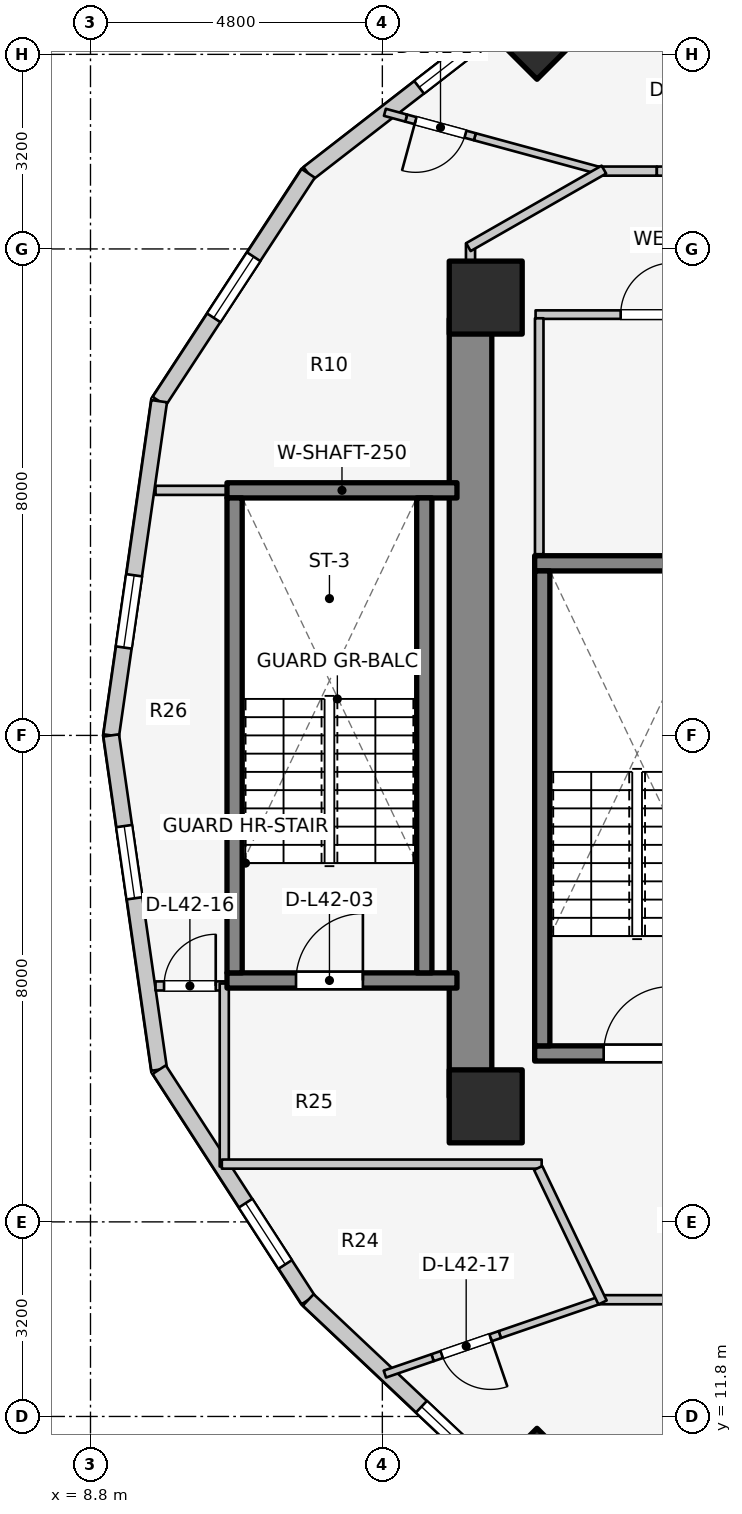
"""IFC4 building model, lengths in metres.
Left out: names, types, materials, properties, quantities, classifications, styles, units other than length and angle.
Written with IfcOpenShell. Run it as: python <this file> out.ifc"""

import sys

from ifc_helpers import new_model, si_unit, direction, frame, frame_2d, origin, origin_2d, place, context, subcontext, project, spatial, rectangle, extrude, element, fill, save


model = new_model("IFC4")
c1 = context("Model", 3, precision=1e-05, world=origin(), true_north=direction((0.0, 1.0)))
c2 = subcontext(c1, "Body", "Model", "MODEL_VIEW")
j1 = project(units=[si_unit("LENGTHUNIT", "METRE"), si_unit("PLANEANGLEUNIT", "RADIAN")], contexts=[c1])
p1 = place(None, origin())
s1 = spatial("IfcSite", under=j1, at=p1, CompositionType="ELEMENT")
p2 = place(p1, origin())
s2 = spatial("IfcBuilding", under=s1, at=p2, CompositionType="ELEMENT")
p3 = place(p2, frame((0.0, 0.0, 140.5)))
s3 = spatial("IfcBuildingStorey", under=s2, at=p3, CompositionType="ELEMENT", Elevation=140.5)
p4 = place(p3, frame((15.05, 17.05, 0.0), z_axis=(0.0, 0.0, 1.0), x_axis=(0.0, 1.0, 0.0)))
e1 = element("IfcWall", 1, at=p4, inside=s3, PredefinedType="SHEAR", context=c2, shape_type="SweptSolid", body=[
    extrude(rectangle(XDim=12.8, YDim=0.7, at=frame_2d((6.4, 0.0))), origin(), (0.0, 0.0, 1.0), 3.1),
])
p5 = place(p3, frame((16.105, 17.77, 0.0), z_axis=(0.0, 0.0, 1.0), x_axis=(1.0, 0.0, 0.0)))
e2 = element("IfcWall", 2, at=p5, inside=s3, PredefinedType="SOLIDWALL", context=c2, shape_type="SweptSolid", body=[
    extrude(rectangle(XDim=3.37, YDim=0.25, at=frame_2d((1.685, 0.0))), origin(), (0.0, 0.0, 1.0), 3.1),
])
p6 = place(p5, frame((1.135, 0.0, 0.0)))
e3 = element("IfcOpeningElement", 3, at=p6, cuts=e2, PredefinedType="OPENING", context=c2, shape_type="SweptSolid", body=[
    extrude(rectangle(XDim=1.1, YDim=2.1, at=frame_2d((0.55, 1.05))), frame((0.0, 0.135, 0.0), z_axis=(0.0, -1.0, 0.0), x_axis=(1.0, 0.0, 0.0)), (0.0, 0.0, 1.0), 0.27),
])
p7 = place(p3, frame((16.105, 25.83, 0.0), z_axis=(0.0, 0.0, 1.0), x_axis=(1.0, 0.0, 0.0)))
e4 = element("IfcWall", 4, at=p7, inside=s3, PredefinedType="SOLIDWALL", context=c2, shape_type="SweptSolid", body=[
    extrude(rectangle(XDim=3.37, YDim=0.25, at=frame_2d((1.685, 0.0))), origin(), (0.0, 0.0, 1.0), 3.1),
])
p8 = place(p3, frame((16.23, 17.895, 0.0), z_axis=(0.0, 0.0, 1.0), x_axis=(0.0, 1.0, 0.0)))
e5 = element("IfcWall", 5, at=p8, inside=s3, PredefinedType="SOLIDWALL", context=c2, shape_type="SweptSolid", body=[
    extrude(rectangle(XDim=7.81, YDim=0.25, at=frame_2d((3.905, 0.0))), origin(), (0.0, 0.0, 1.0), 3.1),
])
p9 = place(p3, frame((11.045, 18.97, 0.0), z_axis=(0.0, 0.0, 1.0), x_axis=(1.0, 0.0, 0.0)))
e6 = element("IfcWall", 6, at=p9, inside=s3, PredefinedType="SOLIDWALL", context=c2, shape_type="SweptSolid", body=[
    extrude(rectangle(XDim=3.782, YDim=0.25, at=frame_2d((1.891, 0.0))), origin(), (0.0, 0.0, 1.0), 3.1),
])
p10 = place(p9, frame((1.135, 0.0, 0.0)))
e7 = element("IfcOpeningElement", 7, at=p10, cuts=e6, PredefinedType="OPENING", context=c2, shape_type="SweptSolid", body=[
    extrude(rectangle(XDim=1.1, YDim=2.1, at=frame_2d((0.55, 1.05))), frame((0.0, 0.135, 0.0), z_axis=(0.0, -1.0, 0.0), x_axis=(1.0, 0.0, 0.0)), (0.0, 0.0, 1.0), 0.27),
])
p11 = place(p3, frame((11.045, 27.03, 0.0), z_axis=(0.0, 0.0, 1.0), x_axis=(1.0, 0.0, 0.0)))
e8 = element("IfcWall", 8, at=p11, inside=s3, PredefinedType="SOLIDWALL", context=c2, shape_type="SweptSolid", body=[
    extrude(rectangle(XDim=3.782, YDim=0.25, at=frame_2d((1.891, 0.0))), origin(), (0.0, 0.0, 1.0), 3.1),
])
for number, where, z_axis, x_axis in (
    (9, (11.17, 19.095, 0.0), (0.0, 0.0, 1.0), (0.0, 1.0, 0.0)),
    (10, (14.29, 19.095, 0.0), (0.0, 0.0, 1.0), (0.0, 1.0, 0.0)),
):
    element("IfcWall", number, at=place(p3, frame(where, z_axis=z_axis, x_axis=x_axis)), inside=s3, PredefinedType="SOLIDWALL", context=c2, shape_type="SweptSolid", body=[
        extrude(rectangle(XDim=7.81, YDim=0.25, at=frame_2d((3.905, 0.0))), origin(), (0.0, 0.0, 1.0), 3.1),
    ])
for number, where, z_axis, x_axis in (
    (11, (15.3, 16.9, 0.0), (0.0, 0.0, 1.0), (1.0, 0.0, 0.0)),
    (12, (15.3, 30.2, 0.0), (0.0, 0.0, 1.0), (1.0, 0.0, 0.0)),
):
    element("IfcColumn", number, at=place(p3, frame(where, z_axis=z_axis, x_axis=x_axis)), inside=s3, PredefinedType="COLUMN", context=c2, shape_type="SweptSolid", body=[
        extrude(rectangle(XDim=1.2, YDim=1.2, at=origin_2d()), origin(), (0.0, 0.0, 1.0), 3.1),
    ])
for number, where, z_axis, x_axis in (
    (13, (16.143, 34.427, 0.0), (0.0, 0.0, 1.0), (-0.707, 0.707, 0.0)),
    (14, (16.143, 10.969, 0.0), (0.0, 0.0, 1.0), (-0.707, -0.707, 0.0)),
):
    element("IfcColumn", number, at=place(p3, frame(where, z_axis=z_axis, x_axis=x_axis)), inside=s3, PredefinedType="COLUMN", context=c2, shape_type="SweptSolid", body=[
        extrude(rectangle(XDim=0.9, YDim=0.9, at=origin_2d()), origin(), (0.0, 0.0, 1.0), 3.1),
    ])
p12 = place(p3, frame((15.731, 34.842, 0.0), z_axis=(0.0, 0.0, 1.0), x_axis=(-0.790185650662, -0.612867552973, 0.0)))
e15 = element("IfcWall", 15, at=p12, inside=s3, PredefinedType="STANDARD", context=c2, shape_type="SweptSolid", body=[
    extrude(rectangle(XDim=4.239, YDim=0.26, at=frame_2d((2.12, 0.0))), origin(), (0.0, 0.0, 1.0), 1.22),
])
p13 = place(p12, frame((0.731, 0.0, 0.15)))
e16 = element("IfcOpeningElement", 16, at=p13, cuts=e15, PredefinedType="OPENING", context=c2, shape_type="SweptSolid", body=[
    extrude(rectangle(XDim=1.2, YDim=0.9, at=frame_2d((0.6, 0.45))), frame((0.0, 0.14, 0.0), z_axis=(0.0, -1.0, 0.0), x_axis=(1.0, 0.0, 0.0)), (0.0, 0.0, 1.0), 0.28),
])
p14 = place(p3, frame((12.381, 32.243, 0.0), z_axis=(0.0, 0.0, 1.0), x_axis=(-0.547456494366, -0.836834145322, 0.0)))
e17 = element("IfcWall", 17, at=p14, inside=s3, PredefinedType="STANDARD", context=c2, shape_type="SweptSolid", body=[
    extrude(rectangle(XDim=4.477, YDim=0.26, at=frame_2d((2.239, 0.0))), origin(), (0.0, 0.0, 1.0), 1.22),
])
p15 = place(p14, frame((1.639, 0.0, 0.15)))
e18 = element("IfcOpeningElement", 18, at=p15, cuts=e17, PredefinedType="OPENING", context=c2, shape_type="SweptSolid", body=[
    extrude(rectangle(XDim=1.2, YDim=0.9, at=frame_2d((0.6, 0.45))), frame((0.0, 0.14, 0.0), z_axis=(0.0, -1.0, 0.0), x_axis=(1.0, 0.0, 0.0)), (0.0, 0.0, 1.0), 0.28),
])
p16 = place(p3, frame((9.93, 28.497, 0.0), z_axis=(0.0, 0.0, 1.0), x_axis=(-0.142227632286, -0.989833976288, 0.0)))
e19 = element("IfcWall", 19, at=p16, inside=s3, PredefinedType="STANDARD", context=c2, shape_type="SweptSolid", body=[
    extrude(rectangle(XDim=5.553, YDim=0.26, at=frame_2d((2.776, 0.0))), origin(), (0.0, 0.0, 1.0), 2.57),
])
p17 = place(p16, frame((2.892, 0.0, 0.75)))
e20 = element("IfcOpeningElement", 20, at=p17, cuts=e19, PredefinedType="OPENING", context=c2, shape_type="SweptSolid", body=[
    extrude(rectangle(XDim=1.2, YDim=1.5, at=frame_2d((0.6, 0.75))), frame((0.0, 0.14, 0.0), z_axis=(0.0, -1.0, 0.0), x_axis=(1.0, 0.0, 0.0)), (0.0, 0.0, 1.0), 0.28),
])
p18 = place(p3, frame((9.14, 23.0, 0.0), z_axis=(0.0, 0.0, 1.0), x_axis=(0.142227632286, -0.989833976288, 0.0)))
e21 = element("IfcWall", 21, at=p18, inside=s3, PredefinedType="STANDARD", context=c2, shape_type="SweptSolid", body=[
    extrude(rectangle(XDim=5.553, YDim=0.26, at=frame_2d((2.776, 0.0))), origin(), (0.0, 0.0, 1.0), 2.57),
])
p19 = place(p18, frame((1.506, 0.0, 0.75)))
e22 = element("IfcOpeningElement", 22, at=p19, cuts=e21, PredefinedType="OPENING", context=c2, shape_type="SweptSolid", body=[
    extrude(rectangle(XDim=1.2, YDim=1.5, at=frame_2d((0.6, 0.75))), frame((0.0, 0.14, 0.0), z_axis=(0.0, -1.0, 0.0), x_axis=(1.0, 0.0, 0.0)), (0.0, 0.0, 1.0), 0.28),
])
p20 = place(p3, frame((9.93, 17.503, 0.0), z_axis=(0.0, 0.0, 1.0), x_axis=(0.543358984534, -0.839500454989, 0.0)))
e23 = element("IfcWall", 23, at=p20, inside=s3, PredefinedType="STANDARD", context=c2, shape_type="SweptSolid", body=[
    extrude(rectangle(XDim=4.511, YDim=0.26, at=frame_2d((2.256, 0.0))), origin(), (0.0, 0.0, 1.0), 1.22),
])
p21 = place(p20, frame((2.615, 0.0, 0.15)))
e24 = element("IfcOpeningElement", 24, at=p21, cuts=e23, PredefinedType="OPENING", context=c2, shape_type="SweptSolid", body=[
    extrude(rectangle(XDim=1.2, YDim=0.9, at=frame_2d((0.6, 0.45))), frame((0.0, 0.14, 0.0), z_axis=(0.0, -1.0, 0.0), x_axis=(1.0, 0.0, 0.0)), (0.0, 0.0, 1.0), 0.28),
])
p22 = place(p3, frame((12.381, 13.716, 0.0), z_axis=(0.0, 0.0, 1.0), x_axis=(0.727667301037, -0.68593024354, 0.0)))
e25 = element("IfcWall", 25, at=p22, inside=s3, PredefinedType="STANDARD", context=c2, shape_type="SweptSolid", body=[
    extrude(rectangle(XDim=4.604, YDim=0.26, at=frame_2d((2.302, 0.0))), origin(), (0.0, 0.0, 1.0), 1.22),
])
p23 = place(p22, frame((2.56, 0.0, 0.15)))
e26 = element("IfcOpeningElement", 26, at=p23, cuts=e25, PredefinedType="OPENING", context=c2, shape_type="SweptSolid", body=[
    extrude(rectangle(XDim=1.2, YDim=0.9, at=frame_2d((0.6, 0.45))), frame((0.0, 0.14, 0.0), z_axis=(0.0, -1.0, 0.0), x_axis=(1.0, 0.0, 0.0)), (0.0, 0.0, 1.0), 0.28),
])
p24 = place(p3, frame((16.12, 29.92, 0.0), z_axis=(0.0, 0.0, 1.0), x_axis=(1.0, 0.0, 0.0)))
e27 = element("IfcWall", 27, at=p24, inside=s3, PredefinedType="PLUMBINGWALL", context=c2, shape_type="SweptSolid", body=[
    extrude(rectangle(XDim=3.3, YDim=0.14, at=frame_2d((1.65, 0.0))), origin(), (0.0, 0.0, 1.0), 2.575),
])
p25 = place(p24, frame((1.399, 0.0, 0.0)))
e28 = element("IfcOpeningElement", 28, at=p25, cuts=e27, PredefinedType="OPENING", context=c2, shape_type="SweptSolid", body=[
    extrude(rectangle(XDim=0.85, YDim=2.05, at=frame_2d((0.425, 1.025))), frame((0.0, 0.08, 0.0), z_axis=(0.0, -1.0, 0.0), x_axis=(1.0, 0.0, 0.0)), (0.0, 0.0, 1.0), 0.16),
])
p26 = place(p3, frame((16.18, 25.98, 0.0), z_axis=(0.0, 0.0, 1.0), x_axis=(0.0, 1.0, 0.0)))
e29 = element("IfcWall", 29, at=p26, inside=s3, PredefinedType="PLUMBINGWALL", context=c2, shape_type="SweptSolid", body=[
    extrude(rectangle(XDim=3.88, YDim=0.14, at=frame_2d((1.94, 0.0))), origin(), (0.0, 0.0, 1.0), 2.575),
])
p27 = place(p3, frame((9.87, 27.03, 0.0), z_axis=(0.0, 0.0, 1.0), x_axis=(1.0, 0.0, 0.0)))
e30 = element("IfcWall", 30, at=p27, inside=s3, PredefinedType="PARTITIONING", context=c2, shape_type="SweptSolid", body=[
    extrude(rectangle(XDim=1.17, YDim=0.15, at=frame_2d((0.585, 0.0))), origin(), (0.0, 0.0, 1.0), 2.575),
])
p28 = place(p3, frame((15.05, 29.8, 0.0), z_axis=(0.0, 0.0, 1.0), x_axis=(0.0, 1.0, 0.0)))
e31 = element("IfcWall", 31, at=p28, inside=s3, PredefinedType="PARTITIONING", context=c2, shape_type="SweptSolid", body=[
    extrude(rectangle(XDim=1.29, YDim=0.15, at=frame_2d((0.645, 0.0))), origin(), (0.0, 0.0, 1.0), 1.22),
])
p29 = place(p3, frame((17.248, 32.267, 0.0), z_axis=(0.0, 0.0, 1.0), x_axis=(-0.964996026859, 0.262264500356, 0.0)))
e32 = element("IfcWall", 32, at=p29, inside=s3, PredefinedType="MOVABLE", context=c2, shape_type="SweptSolid", body=[
    extrude(rectangle(XDim=2.204, YDim=0.12, at=frame_2d((1.102, 0.0))), origin(), (0.0, 0.0, 1.0), 1.22),
])
p30 = place(p3, frame((15.121, 32.845, 0.0), z_axis=(0.0, 0.0, 1.0), x_axis=(-0.964994566257, 0.262269874548, 0.0)))
e33 = element("IfcWall", 33, at=p30, inside=s3, PredefinedType="MOVABLE", context=c2, shape_type="SweptSolid", body=[
    extrude(rectangle(XDim=1.17, YDim=0.12, at=frame_2d((0.585, 0.0))), origin(), (0.0, 0.0, 1.0), 2.575),
])
p31 = place(p30, frame((0.16, 0.0, 0.0)))
e34 = element("IfcOpeningElement", 34, at=p31, cuts=e33, PredefinedType="OPENING", context=c2, shape_type="SweptSolid", body=[
    extrude(rectangle(XDim=0.85, YDim=2.05, at=frame_2d((0.425, 1.025))), frame((0.0, 0.07, 0.0), z_axis=(0.0, -1.0, 0.0), x_axis=(1.0, 0.0, 0.0)), (0.0, 0.0, 1.0), 0.14),
])
p32 = place(p3, frame((13.992, 33.152, 0.0), z_axis=(0.0, 0.0, 1.0), x_axis=(-0.964996222189, 0.26226378164, 0.0)))
e35 = element("IfcWall", 35, at=p32, inside=s3, PredefinedType="MOVABLE", context=c2, shape_type="SweptSolid", body=[
    extrude(rectangle(XDim=0.363, YDim=0.12, at=frame_2d((0.182, 0.0))), origin(), (0.0, 0.0, 1.0), 2.575),
])
p33 = place(p3, frame((17.15, 32.28, 0.0), z_axis=(0.0, 0.0, 1.0), x_axis=(1.0, 0.0, 0.0)))
e36 = element("IfcWall", 36, at=p33, inside=s3, PredefinedType="PARTITIONING", context=c2, shape_type="SweptSolid", body=[
    extrude(rectangle(XDim=0.964, YDim=0.15, at=frame_2d((0.482, 0.0))), origin(), (0.0, 0.0, 1.0), 2.575),
])
p34 = place(p3, frame((18.114, 32.28, 0.0), z_axis=(0.0, 0.0, 1.0), x_axis=(1.0, 0.0, 0.0)))
e37 = element("IfcWall", 37, at=p34, inside=s3, PredefinedType="PARTITIONING", context=c2, shape_type="SweptSolid", body=[
    extrude(rectangle(XDim=1.22, YDim=0.15, at=frame_2d((0.61, 0.0))), origin(), (0.0, 0.0, 1.0), 2.16),
])
p35 = place(p34, frame((0.16, 0.0, 0.0)))
e38 = element("IfcOpeningElement", 38, at=p35, cuts=e37, PredefinedType="OPENING", context=c2, shape_type="SweptSolid", body=[
    extrude(rectangle(XDim=0.9, YDim=2.1, at=frame_2d((0.45, 1.05))), frame((0.0, 0.085, 0.0), z_axis=(0.0, -1.0, 0.0), x_axis=(1.0, 0.0, 0.0)), (0.0, 0.0, 1.0), 0.17),
])
p36 = place(p3, frame((17.243, 32.305, 0.0), z_axis=(0.0, 0.0, 1.0), x_axis=(-0.867991349648, -0.496579315857, 0.0)))
e39 = element("IfcWall", 39, at=p36, inside=s3, PredefinedType="PARTITIONING", context=c2, shape_type="SweptSolid", body=[
    extrude(rectangle(XDim=2.567, YDim=0.15, at=frame_2d((1.283, 0.0))), origin(), (0.0, 0.0, 1.0), 1.22),
])
p37 = place(p3, frame((9.87, 18.88, 0.0), z_axis=(0.0, 0.0, 1.0), x_axis=(1.0, 0.0, 0.0)))
e40 = element("IfcWall", 40, at=p37, inside=s3, PredefinedType="PARTITIONING", context=c2, shape_type="SweptSolid", body=[
    extrude(rectangle(XDim=1.17, YDim=0.15, at=frame_2d((0.585, 0.0))), origin(), (0.0, 0.0, 1.0), 2.575),
])
p38 = place(p37, frame((0.14, 0.0, 0.0)))
e41 = element("IfcOpeningElement", 41, at=p38, cuts=e40, PredefinedType="OPENING", context=c2, shape_type="SweptSolid", body=[
    extrude(rectangle(XDim=0.85, YDim=2.05, at=frame_2d((0.425, 1.025))), frame((0.0, 0.085, 0.0), z_axis=(0.0, -1.0, 0.0), x_axis=(1.0, 0.0, 0.0)), (0.0, 0.0, 1.0), 0.17),
])
p39 = place(p3, frame((11.0, 15.91, 0.0), z_axis=(0.0, 0.0, 1.0), x_axis=(0.0, 1.0, 0.0)))
e42 = element("IfcWall", 42, at=p39, inside=s3, PredefinedType="PARTITIONING", context=c2, shape_type="SweptSolid", body=[
    extrude(rectangle(XDim=3.01, YDim=0.15, at=frame_2d((1.505, 0.0))), origin(), (0.0, 0.0, 1.0), 2.575),
])
p40 = place(p3, frame((10.96, 15.95, 0.0), z_axis=(0.0, 0.0, 1.0), x_axis=(1.0, 0.0, 0.0)))
e43 = element("IfcWall", 43, at=p40, inside=s3, PredefinedType="PARTITIONING", context=c2, shape_type="SweptSolid", body=[
    extrude(rectangle(XDim=5.26, YDim=0.15, at=frame_2d((2.63, 0.0))), origin(), (0.0, 0.0, 1.0), 1.22),
])
p41 = place(p3, frame((17.247, 13.736, 0.0), z_axis=(0.0, 0.0, 1.0), x_axis=(-0.945652975294, -0.325177567366, 0.0)))
e44 = element("IfcWall", 44, at=p41, inside=s3, PredefinedType="MOVABLE", context=c2, shape_type="SweptSolid", body=[
    extrude(rectangle(XDim=1.814, YDim=0.12, at=frame_2d((0.907, 0.0))), origin(), (0.0, 0.0, 1.0), 1.22),
])
p42 = place(p3, frame((15.532, 13.146, 0.0), z_axis=(0.0, 0.0, 1.0), x_axis=(-0.945742719509, -0.324916463874, 0.0)))
e45 = element("IfcWall", 45, at=p42, inside=s3, PredefinedType="MOVABLE", context=c2, shape_type="SweptSolid", body=[
    extrude(rectangle(XDim=1.17, YDim=0.12, at=frame_2d((0.585, 0.0))), origin(), (0.0, 0.0, 1.0), 2.11),
])
p43 = place(p42, frame((0.16, 0.0, 0.0)))
e46 = element("IfcOpeningElement", 46, at=p43, cuts=e45, PredefinedType="OPENING", context=c2, shape_type="SweptSolid", body=[
    extrude(rectangle(XDim=0.85, YDim=2.05, at=frame_2d((0.425, 1.025))), frame((0.0, 0.07, 0.0), z_axis=(0.0, -1.0, 0.0), x_axis=(1.0, 0.0, 0.0)), (0.0, 0.0, 1.0), 0.14),
])
p44 = place(p3, frame((14.426, 12.766, 0.0), z_axis=(0.0, 0.0, 1.0), x_axis=(-0.945666792175, -0.325137383544, 0.0)))
e47 = element("IfcWall", 47, at=p44, inside=s3, PredefinedType="MOVABLE", context=c2, shape_type="SweptSolid", body=[
    extrude(rectangle(XDim=0.829, YDim=0.12, at=frame_2d((0.415, 0.0))), origin(), (0.0, 0.0, 1.0), 2.575),
])
p45 = place(p3, frame((17.15, 13.72, 0.0), z_axis=(0.0, 0.0, 1.0), x_axis=(1.0, 0.0, 0.0)))
e48 = element("IfcWall", 48, at=p45, inside=s3, PredefinedType="PARTITIONING", context=c2, shape_type="SweptSolid", body=[
    extrude(rectangle(XDim=1.14, YDim=0.15, at=frame_2d((0.57, 0.0))), origin(), (0.0, 0.0, 1.0), 2.575),
])
p46 = place(p3, frame((17.222, 13.675, 0.0), z_axis=(0.0, 0.0, 1.0), x_axis=(-0.431973389813, 0.901886351207, 0.0)))
e49 = element("IfcWall", 49, at=p46, inside=s3, PredefinedType="PARTITIONING", context=c2, shape_type="SweptSolid", body=[
    extrude(rectangle(XDim=2.452, YDim=0.15, at=frame_2d((1.226, 0.0))), origin(), (0.0, 0.0, 1.0), 2.575),
])
p47 = place(p13, origin())
e50 = element("IfcWindow", 50, at=p47, inside=s3, PartitioningType="SINGLE_PANEL", PredefinedType="WINDOW", context=c2, shape_type="SweptSolid", body=[
    extrude(rectangle(XDim=1.2, YDim=0.9, at=frame_2d((0.6, 0.45))), frame((0.0, 0.03, 0.0), z_axis=(0.0, -1.0, 0.0), x_axis=(1.0, 0.0, 0.0)), (0.0, 0.0, 1.0), 0.06),
])
fill(e16, e50)
p48 = place(p15, origin())
e51 = element("IfcWindow", 51, at=p48, inside=s3, PartitioningType="SINGLE_PANEL", PredefinedType="WINDOW", context=c2, shape_type="SweptSolid", body=[
    extrude(rectangle(XDim=1.2, YDim=0.9, at=frame_2d((0.6, 0.45))), frame((0.0, 0.03, 0.0), z_axis=(0.0, -1.0, 0.0), x_axis=(1.0, 0.0, 0.0)), (0.0, 0.0, 1.0), 0.06),
])
fill(e18, e51)
p49 = place(p17, origin())
e52 = element("IfcWindow", 52, at=p49, inside=s3, PartitioningType="SINGLE_PANEL", PredefinedType="WINDOW", context=c2, shape_type="SweptSolid", body=[
    extrude(rectangle(XDim=1.2, YDim=1.5, at=frame_2d((0.6, 0.75))), frame((0.0, 0.03, 0.0), z_axis=(0.0, -1.0, 0.0), x_axis=(1.0, 0.0, 0.0)), (0.0, 0.0, 1.0), 0.06),
])
fill(e20, e52)
p50 = place(p19, origin())
e53 = element("IfcWindow", 53, at=p50, inside=s3, PartitioningType="SINGLE_PANEL", PredefinedType="WINDOW", context=c2, shape_type="SweptSolid", body=[
    extrude(rectangle(XDim=1.2, YDim=1.5, at=frame_2d((0.6, 0.75))), frame((0.0, 0.03, 0.0), z_axis=(0.0, -1.0, 0.0), x_axis=(1.0, 0.0, 0.0)), (0.0, 0.0, 1.0), 0.06),
])
fill(e22, e53)
p51 = place(p21, origin())
e54 = element("IfcWindow", 54, at=p51, inside=s3, PartitioningType="SINGLE_PANEL", PredefinedType="WINDOW", context=c2, shape_type="SweptSolid", body=[
    extrude(rectangle(XDim=1.2, YDim=0.9, at=frame_2d((0.6, 0.45))), frame((0.0, 0.03, 0.0), z_axis=(0.0, -1.0, 0.0), x_axis=(1.0, 0.0, 0.0)), (0.0, 0.0, 1.0), 0.06),
])
fill(e24, e54)
p52 = place(p23, origin())
e55 = element("IfcWindow", 55, at=p52, inside=s3, PartitioningType="SINGLE_PANEL", PredefinedType="WINDOW", context=c2, shape_type="SweptSolid", body=[
    extrude(rectangle(XDim=1.2, YDim=0.9, at=frame_2d((0.6, 0.45))), frame((0.0, 0.03, 0.0), z_axis=(0.0, -1.0, 0.0), x_axis=(1.0, 0.0, 0.0)), (0.0, 0.0, 1.0), 0.06),
])
fill(e26, e55)
p53 = place(p6, origin())
e56 = element("IfcDoor", 56, at=p53, inside=s3, OperationType="SINGLE_SWING_RIGHT", PredefinedType="DOOR", context=c2, shape_type="SweptSolid", body=[
    extrude(rectangle(XDim=1.1, YDim=2.1, at=frame_2d((0.55, 1.05))), frame((0.0, 0.025, 0.0), z_axis=(0.0, -1.0, 0.0), x_axis=(1.0, 0.0, 0.0)), (0.0, 0.0, 1.0), 0.05),
])
fill(e3, e56)
p54 = place(p10, origin())
e57 = element("IfcDoor", 57, at=p54, inside=s3, OperationType="SINGLE_SWING_RIGHT", PredefinedType="DOOR", context=c2, shape_type="SweptSolid", body=[
    extrude(rectangle(XDim=1.1, YDim=2.1, at=frame_2d((0.55, 1.05))), frame((0.0, 0.025, 0.0), z_axis=(0.0, -1.0, 0.0), x_axis=(1.0, 0.0, 0.0)), (0.0, 0.0, 1.0), 0.05),
])
fill(e7, e57)
p55 = place(p25, origin())
e58 = element("IfcDoor", 58, at=p55, inside=s3, OperationType="SINGLE_SWING_RIGHT", PredefinedType="DOOR", context=c2, shape_type="SweptSolid", body=[
    extrude(rectangle(XDim=0.85, YDim=2.05, at=frame_2d((0.425, 1.025))), frame((0.0, 0.025, 0.0), z_axis=(0.0, -1.0, 0.0), x_axis=(1.0, 0.0, 0.0)), (0.0, 0.0, 1.0), 0.05),
])
fill(e28, e58)
p56 = place(p31, origin())
e59 = element("IfcDoor", 59, at=p56, inside=s3, OperationType="SINGLE_SWING_RIGHT", PredefinedType="DOOR", context=c2, shape_type="SweptSolid", body=[
    extrude(rectangle(XDim=0.85, YDim=2.05, at=frame_2d((0.425, 1.025))), frame((0.0, 0.025, 0.0), z_axis=(0.0, -1.0, 0.0), x_axis=(1.0, 0.0, 0.0)), (0.0, 0.0, 1.0), 0.05),
])
fill(e34, e59)
p57 = place(p38, origin())
e60 = element("IfcDoor", 60, at=p57, inside=s3, OperationType="SINGLE_SWING_RIGHT", PredefinedType="DOOR", context=c2, shape_type="SweptSolid", body=[
    extrude(rectangle(XDim=0.85, YDim=2.05, at=frame_2d((0.425, 1.025))), frame((0.0, 0.025, 0.0), z_axis=(0.0, -1.0, 0.0), x_axis=(1.0, 0.0, 0.0)), (0.0, 0.0, 1.0), 0.05),
])
fill(e41, e60)
p58 = place(p43, origin())
e61 = element("IfcDoor", 61, at=p58, inside=s3, OperationType="SINGLE_SWING_LEFT", PredefinedType="DOOR", context=c2, shape_type="SweptSolid", body=[
    extrude(rectangle(XDim=0.85, YDim=2.05, at=frame_2d((0.425, 1.025))), frame((0.0, 0.025, 0.0), z_axis=(0.0, -1.0, 0.0), x_axis=(1.0, 0.0, 0.0)), (0.0, 0.0, 1.0), 0.05),
])
fill(e46, e61)
save(model, sys.argv[1])
